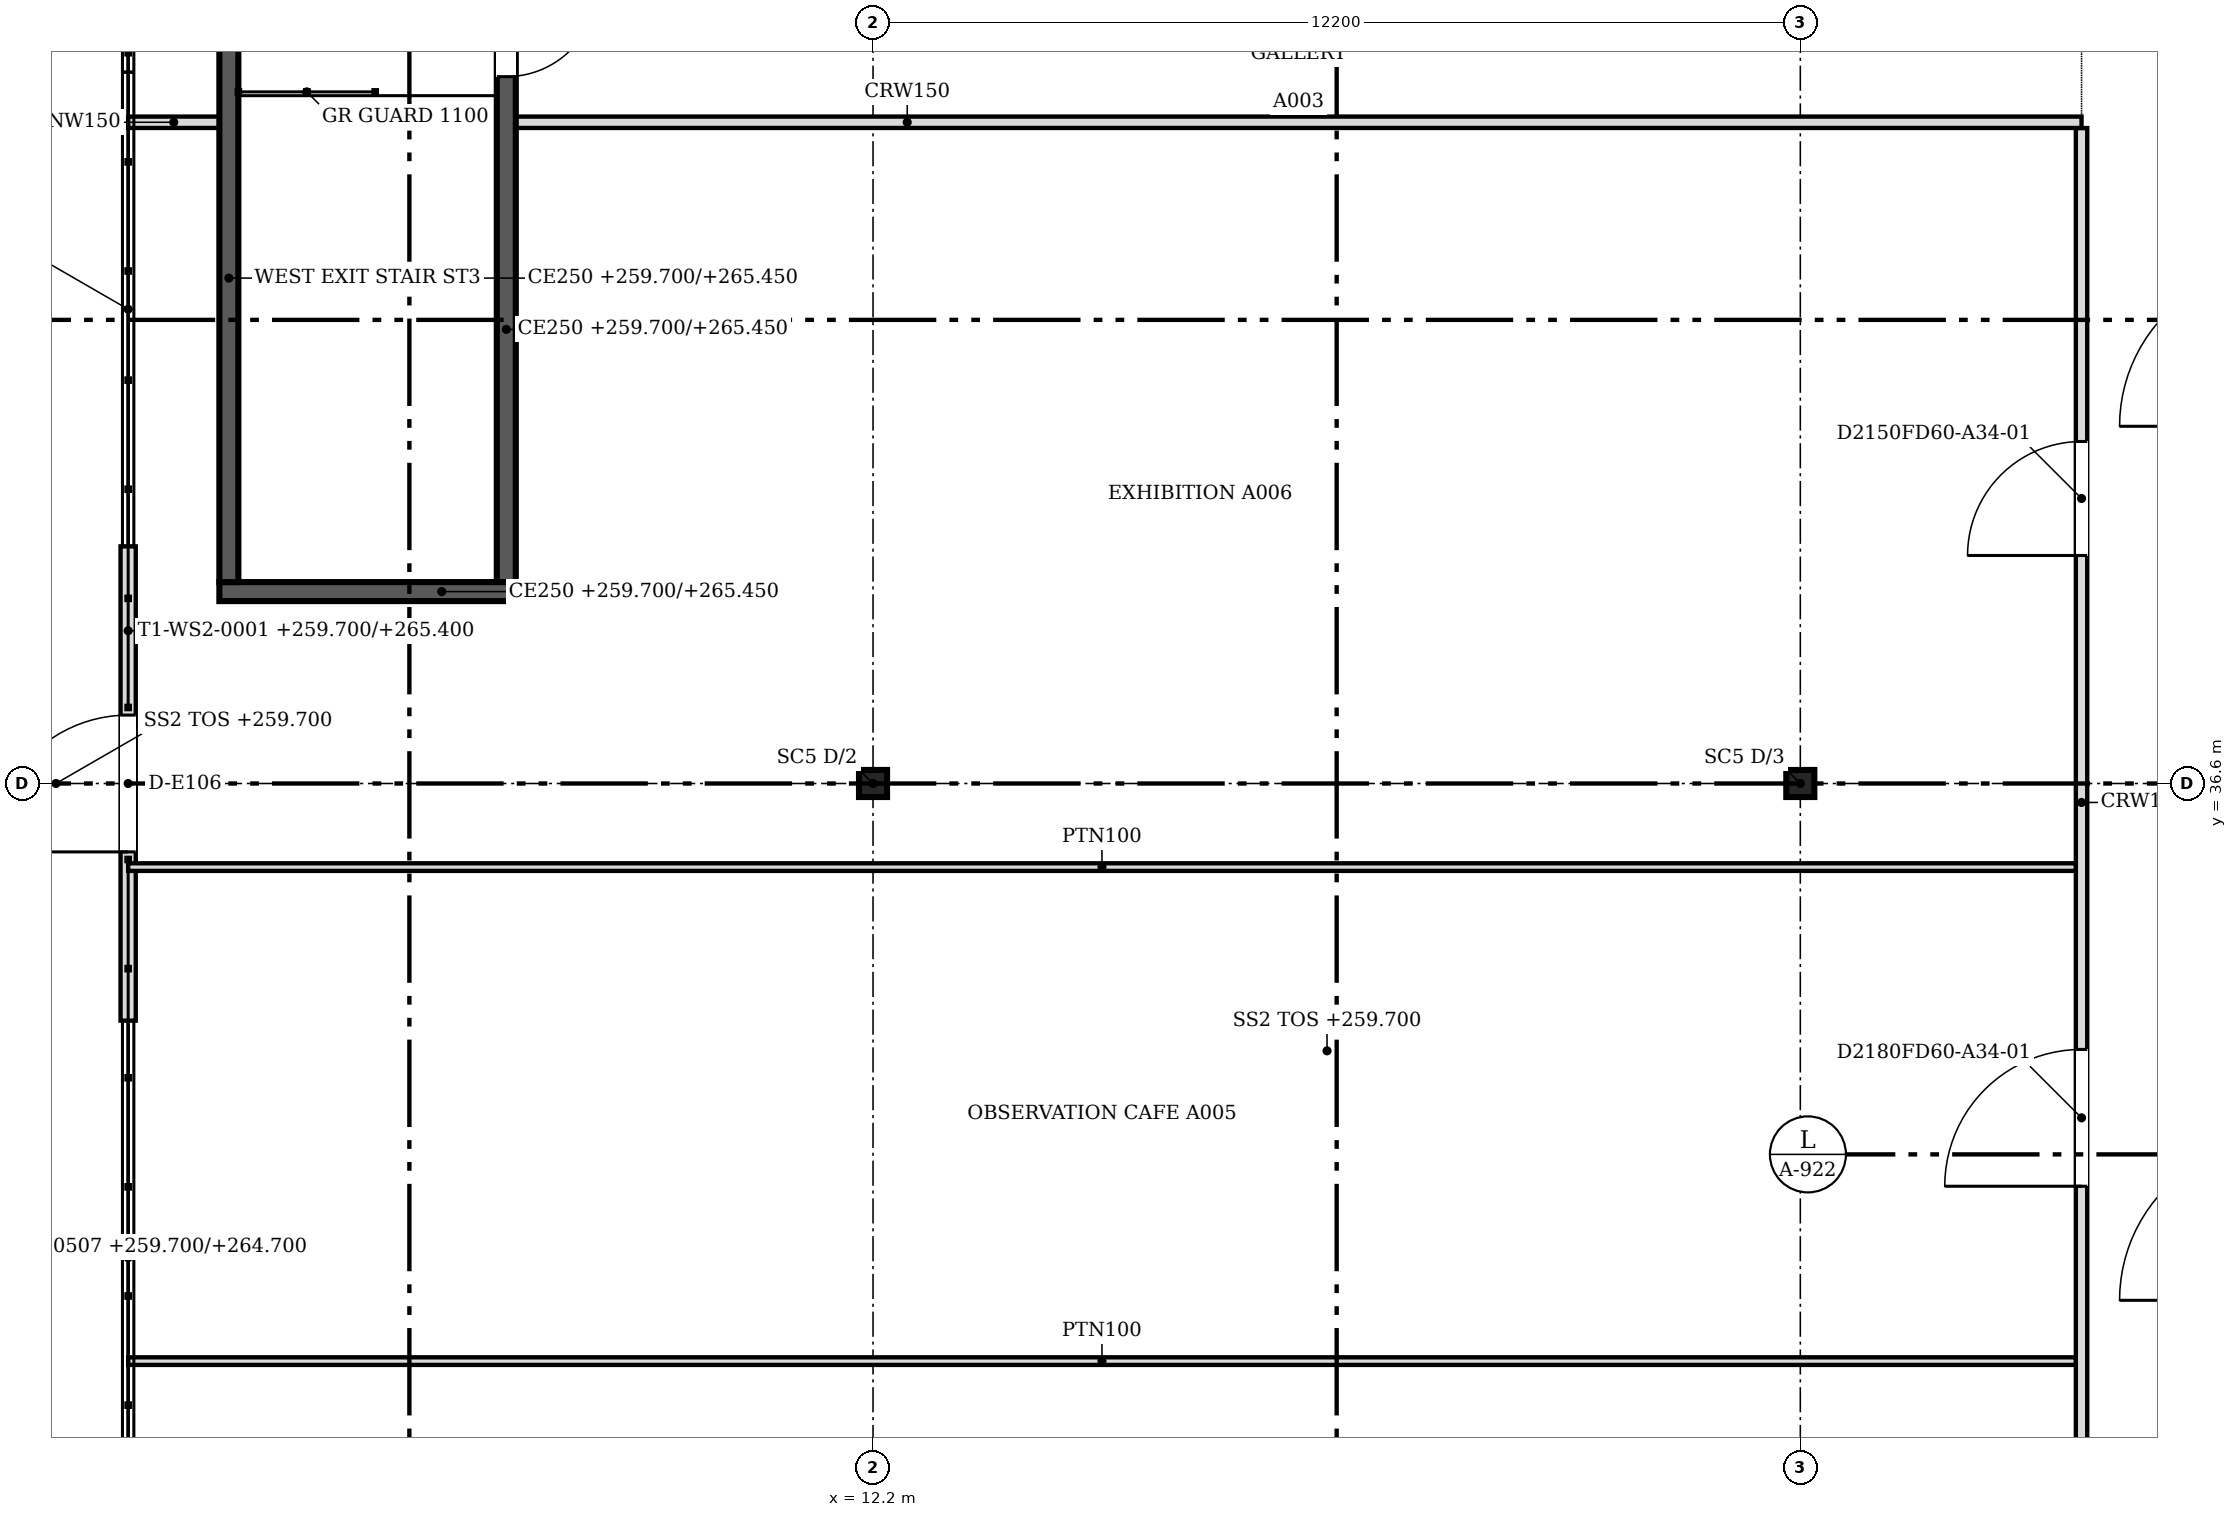
"""IFC4 building model, lengths in metres.
Left out: names, types, materials, properties, quantities, classifications, styles, units other than length and angle.
Written with IfcOpenShell. Run it as: python <this file> out.ifc"""

import sys

from ifc_helpers import new_model, si_unit, direction, frame, frame_2d, origin, origin_2d, place, context, subcontext, project, spatial, polyline, rectangle, i_section, outline, extrude, source, transform, mapped, element, fill, save


model = new_model("IFC4")
c1 = context("Model", 3, precision=1e-05, world=origin(), true_north=direction((0.0, 1.0)))
c2 = subcontext(c1, "Body", "Model", "MODEL_VIEW")
j1 = project(units=[si_unit("LENGTHUNIT", "METRE"), si_unit("PLANEANGLEUNIT", "RADIAN")], contexts=[c1])
p1 = place(None, origin())
s1 = spatial("IfcSite", under=j1, at=p1, CompositionType="ELEMENT")
p2 = place(p1, origin())
s2 = spatial("IfcBuilding", under=s1, at=p2, CompositionType="ELEMENT")
p3 = place(p2, frame((0.0, 0.0, 259.7)))
s3 = spatial("IfcBuildingStorey", under=s2, at=p3, CompositionType="ELEMENT", Elevation=259.7)
for number, where, z_axis, x_axis in (
    (1, (12.2, 36.6, 0.0), (0.0, 0.0, 1.0), (1.0, 0.0, 0.0)),
    (2, (24.4, 36.6, 0.0), (0.0, 0.0, 1.0), (1.0, 0.0, 0.0)),
):
    element("IfcColumn", number, at=place(p3, frame(where, z_axis=z_axis, x_axis=x_axis)), inside=s3, PredefinedType="COLUMN", context=c2, shape_type="SweptSolid", body=[
        extrude(i_section(OverallWidth=0.369, OverallDepth=0.356, WebThickness=0.011, FlangeThickness=0.018, at=origin_2d()), origin(), (0.0, 0.0, 1.0), 5.7),
    ])
p4 = place(p3, frame((2.4, 33.48, 0.0), z_axis=(0.0, 0.0, 1.0), x_axis=(0.0, 1.0, 0.0)))
e3 = element("IfcWall", 3, at=p4, inside=s3, PredefinedType="PARTITIONING", context=c2, shape_type="SweptSolid", body=[
    extrude(rectangle(XDim=6.24, YDim=0.2, at=frame_2d((3.12, 0.0))), origin(), (0.0, 0.0, 1.0), 5.7),
])
m1 = source(origin(), c2, "Body", "SweptSolid", [
    extrude(rectangle(XDim=1.8, YDim=2.7, at=frame_2d((0.9, 1.35))), frame((0.0, 0.11, 0.0), z_axis=(0.0, -1.0, 0.0), x_axis=(1.0, 0.0, 0.0)), (0.0, 0.0, 1.0), 0.22),
])
p5 = place(p4, frame((2.22, 0.0, 0.0)))
e4 = element("IfcOpeningElement", 4, at=p5, cuts=e3, PredefinedType="OPENING", context=c2, shape_type="MappedRepresentation", body=[
    mapped(m1, transform((0.0, 0.0, 0.0), scale=1.0)),
])
m2 = source(origin(), c2, "Body", "SweptSolid", [
    extrude(outline(polyline([(0.12, 0.1), (2.1, 0.1), (2.1, 5.6), (0.12, 5.6), (0.12, 0.1)])), frame((0.0, 0.11, 0.0), z_axis=(0.0, -1.0, 0.0), x_axis=(1.0, 0.0, 0.0)), (0.0, 0.0, 1.0), 0.22),
])
p6 = place(p4, origin())
e5 = element("IfcOpeningElement", 5, at=p6, cuts=e3, PredefinedType="OPENING", context=c2, shape_type="MappedRepresentation", body=[
    mapped(m2, transform((0.0, 0.0, 0.0), scale=1.0)),
])
m3 = source(origin(), c2, "Body", "SweptSolid", [
    extrude(outline(polyline([(4.14, 0.1), (6.12, 0.1), (6.12, 5.6), (4.14, 5.6), (4.14, 0.1)])), frame((0.0, 0.11, 0.0), z_axis=(0.0, -1.0, 0.0), x_axis=(1.0, 0.0, 0.0)), (0.0, 0.0, 1.0), 0.22),
])
p7 = place(p4, origin())
e6 = element("IfcOpeningElement", 6, at=p7, cuts=e3, PredefinedType="OPENING", context=c2, shape_type="MappedRepresentation", body=[
    mapped(m3, transform((0.0, 0.0, 0.0), scale=1.0)),
])
m4 = source(origin(), c2, "Body", "SweptSolid", [
    extrude(outline(polyline([(2.22, 2.82), (4.02, 2.82), (4.02, 5.6), (2.22, 5.6), (2.22, 2.82)])), frame((0.0, 0.11, 0.0), z_axis=(0.0, -1.0, 0.0), x_axis=(1.0, 0.0, 0.0)), (0.0, 0.0, 1.0), 0.22),
])
p8 = place(p4, origin())
e7 = element("IfcOpeningElement", 7, at=p8, cuts=e3, PredefinedType="OPENING", context=c2, shape_type="MappedRepresentation", body=[
    mapped(m4, transform((0.0, 0.0, 0.0), scale=1.0)),
])
p9 = place(p3, frame((7.5, 39.125, 0.0), z_axis=(0.0, 0.0, 1.0), x_axis=(-1.0, 0.0, 0.0)))
e8 = element("IfcWall", 8, at=p9, inside=s3, PredefinedType="SOLIDWALL", context=c2, shape_type="SweptSolid", body=[
    extrude(rectangle(XDim=3.9, YDim=0.25, at=frame_2d((1.95, 0.0))), origin(), (0.0, 0.0, 1.0), 5.75),
])
p10 = place(p3, frame((3.725, 39.25, 0.0), z_axis=(0.0, 0.0, 1.0), x_axis=(0.0, 1.0, 0.0)))
e9 = element("IfcWall", 9, at=p10, inside=s3, PredefinedType="SOLIDWALL", context=c2, shape_type="SweptSolid", body=[
    extrude(rectangle(XDim=8.0, YDim=0.25, at=frame_2d((4.0, 0.0))), origin(), (0.0, 0.0, 1.0), 5.75),
])
p11 = place(p3, frame((7.375, 47.25, 0.0), z_axis=(0.0, 0.0, 1.0), x_axis=(0.0, -1.0, 0.0)))
e10 = element("IfcWall", 10, at=p11, inside=s3, PredefinedType="SOLIDWALL", context=c2, shape_type="SweptSolid", body=[
    extrude(rectangle(XDim=8.0, YDim=0.25, at=frame_2d((4.0, 0.0))), origin(), (0.0, 0.0, 1.0), 5.75),
])
m5 = source(origin(), c2, "Body", "SweptSolid", [
    extrude(rectangle(XDim=1.2, YDim=2.1, at=frame_2d((0.6, 1.05))), frame((0.0, 0.135, 0.0), z_axis=(0.0, -1.0, 0.0), x_axis=(1.0, 0.0, 0.0)), (0.0, 0.0, 1.0), 0.27),
])
p12 = place(p11, frame((0.15, 0.0, 0.0)))
e11 = element("IfcOpeningElement", 11, at=p12, cuts=e10, PredefinedType="OPENING", context=c2, shape_type="MappedRepresentation", body=[
    mapped(m5, transform((0.0, 0.0, 0.0), scale=1.0)),
])
p13 = place(p3, frame((28.1, 22.0, 0.0), z_axis=(0.0, 0.0, 1.0), x_axis=(0.0, 1.0, 0.0)))
e12 = element("IfcWall", 12, at=p13, inside=s3, PredefinedType="PARTITIONING", context=c2, shape_type="SweptSolid", body=[
    extrude(rectangle(XDim=23.224, YDim=0.15, at=frame_2d((11.612, 0.0))), origin(), (0.0, 0.0, 1.0), 5.167),
])
m6 = source(origin(), c2, "Body", "SweptSolid", [
    extrude(rectangle(XDim=1.8, YDim=2.1, at=frame_2d((0.9, 1.05))), frame((0.0, 0.085, 0.0), z_axis=(0.0, -1.0, 0.0), x_axis=(1.0, 0.0, 0.0)), (0.0, 0.0, 1.0), 0.17),
])
p14 = place(p13, frame((9.301, 0.0, 0.0)))
e13 = element("IfcOpeningElement", 13, at=p14, cuts=e12, PredefinedType="OPENING", context=c2, shape_type="MappedRepresentation", body=[
    mapped(m6, transform((0.0, 0.0, 0.0), scale=1.0)),
])
p15 = place(p13, frame((2.6, 0.0, 0.0)))
e14 = element("IfcOpeningElement", 14, at=p15, cuts=e12, PredefinedType="OPENING", context=c2, shape_type="MappedRepresentation", body=[
    mapped(m6, transform((0.0, 0.0, 0.0), scale=1.0)),
])
m7 = source(origin(), c2, "Body", "SweptSolid", [
    extrude(rectangle(XDim=1.5, YDim=2.1, at=frame_2d((0.75, 1.05))), frame((0.0, 0.085, 0.0), z_axis=(0.0, -1.0, 0.0), x_axis=(1.0, 0.0, 0.0)), (0.0, 0.0, 1.0), 0.17),
])
p16 = place(p13, frame((17.6, 0.0, 0.0)))
e15 = element("IfcOpeningElement", 15, at=p16, cuts=e12, PredefinedType="OPENING", context=c2, shape_type="MappedRepresentation", body=[
    mapped(m7, transform((0.0, 0.0, 0.0), scale=1.0)),
])
for number, where, z_axis, x_axis in (
    (16, (2.4, 29.0, 0.0), (0.0, 0.0, 1.0), (1.0, 0.0, 0.0)),
    (17, (2.4, 35.5, 0.0), (0.0, 0.0, 1.0), (1.0, 0.0, 0.0)),
):
    element("IfcWall", number, at=place(p3, frame(where, z_axis=z_axis, x_axis=x_axis)), inside=s3, PredefinedType="PARTITIONING", context=c2, shape_type="SweptSolid", body=[
        extrude(rectangle(XDim=25.624, YDim=0.1, at=frame_2d((12.812, 0.0))), origin(), (0.0, 0.0, 1.0), 5.167),
    ])
p17 = place(p3, frame((2.4, 45.3, 0.0), z_axis=(0.0, 0.0, 1.0), x_axis=(1.0, 0.0, 0.0)))
e18 = element("IfcWall", 18, at=p17, inside=s3, PredefinedType="PARTITIONING", context=c2, shape_type="SweptSolid", body=[
    extrude(rectangle(XDim=1.2, YDim=0.15, at=frame_2d((0.6, 0.0))), origin(), (0.0, 0.0, 1.0), 5.167),
])
p18 = place(p3, frame((7.5, 45.3, 0.0), z_axis=(0.0, 0.0, 1.0), x_axis=(1.0, 0.0, 0.0)))
e19 = element("IfcWall", 19, at=p18, inside=s3, PredefinedType="PARTITIONING", context=c2, shape_type="SweptSolid", body=[
    extrude(rectangle(XDim=20.6, YDim=0.15, at=frame_2d((10.3, 0.0))), origin(), (0.0, 0.0, 1.0), 5.167),
])
m8 = source(origin(), c2, "Body", "SweptSolid", [
    extrude(rectangle(XDim=1.8, YDim=2.7, at=frame_2d((0.9, 1.35))), frame((0.0, 0.025, 0.0), z_axis=(0.0, -1.0, 0.0), x_axis=(1.0, 0.0, 0.0)), (0.0, 0.0, 1.0), 0.05),
])
p19 = place(p5, origin())
e20 = element("IfcDoor", 20, at=p19, inside=s3, OperationType="DOUBLE_DOOR_SINGLE_SWING", PredefinedType="DOOR", context=c2, shape_type="MappedRepresentation", body=[
    mapped(m8, transform((0.0, 0.0, 0.0), scale=1.0)),
])
fill(e4, e20)
m9 = source(origin(), c2, "Body", "SweptSolid", [
    extrude(rectangle(XDim=1.2, YDim=2.1, at=frame_2d((0.6, 1.05))), frame((0.0, 0.025, 0.0), z_axis=(0.0, -1.0, 0.0), x_axis=(1.0, 0.0, 0.0)), (0.0, 0.0, 1.0), 0.05),
])
p20 = place(p12, origin())
e21 = element("IfcDoor", 21, at=p20, inside=s3, OperationType="SINGLE_SWING_LEFT", PredefinedType="DOOR", context=c2, shape_type="MappedRepresentation", body=[
    mapped(m9, transform((0.0, 0.0, 0.0), scale=1.0)),
])
fill(e11, e21)
m10 = source(origin(), c2, "Body", "SweptSolid", [
    extrude(rectangle(XDim=1.8, YDim=2.1, at=frame_2d((0.9, 1.05))), frame((0.0, 0.025, 0.0), z_axis=(0.0, -1.0, 0.0), x_axis=(1.0, 0.0, 0.0)), (0.0, 0.0, 1.0), 0.05),
])
p21 = place(p14, origin())
e22 = element("IfcDoor", 22, at=p21, inside=s3, OperationType="DOUBLE_DOOR_SINGLE_SWING", PredefinedType="DOOR", context=c2, shape_type="MappedRepresentation", body=[
    mapped(m10, transform((0.0, 0.0, 0.0), scale=1.0)),
])
fill(e13, e22)
m11 = source(origin(), c2, "Body", "SweptSolid", [
    extrude(rectangle(XDim=1.5, YDim=2.1, at=frame_2d((0.75, 1.05))), frame((0.0, 0.025, 0.0), z_axis=(0.0, -1.0, 0.0), x_axis=(1.0, 0.0, 0.0)), (0.0, 0.0, 1.0), 0.05),
])
p22 = place(p16, origin())
e23 = element("IfcDoor", 23, at=p22, inside=s3, OperationType="SINGLE_SWING_LEFT", PredefinedType="DOOR", context=c2, shape_type="MappedRepresentation", body=[
    mapped(m11, transform((0.0, 0.0, 0.0), scale=1.0)),
])
fill(e15, e23)
save(model, sys.argv[1])
